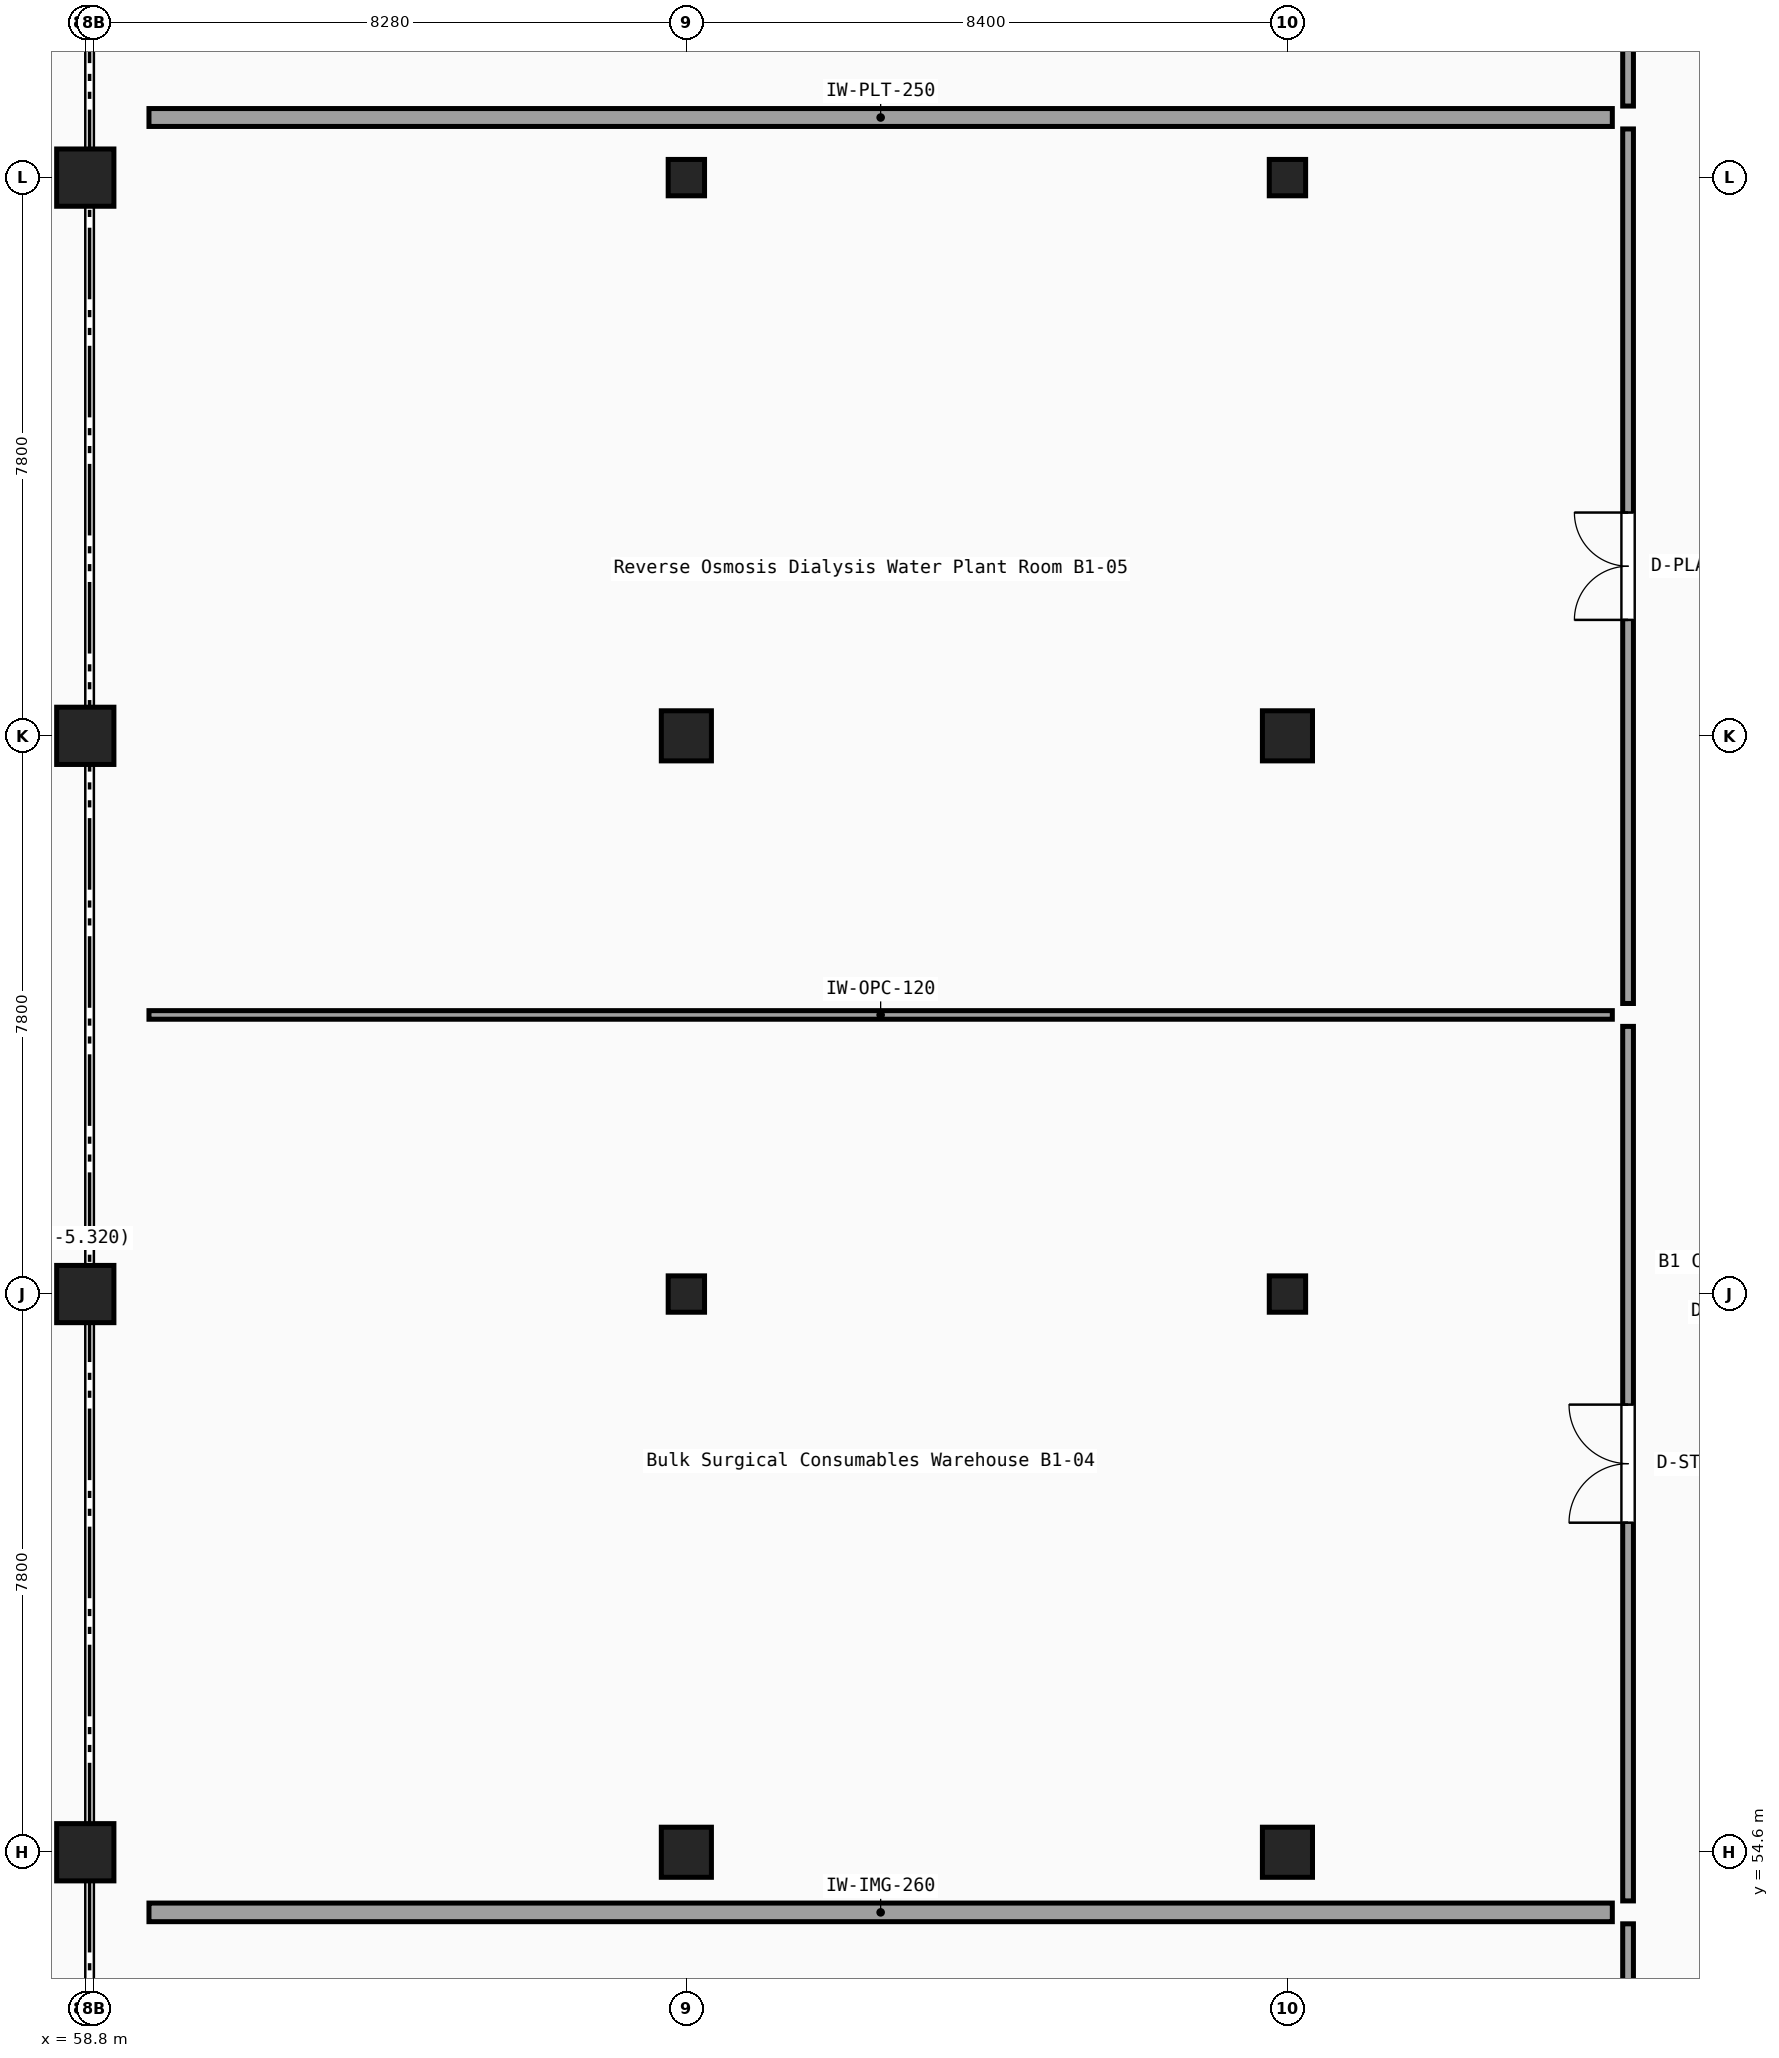
"""IFC4 building model, lengths in metres.
Left out: names, types, materials, properties, quantities, classifications, styles, units other than length and angle.
Written with IfcOpenShell. Run it as: python <this file> out.ifc"""

import sys

from ifc_helpers import new_model, si_unit, direction, frame, frame_2d, origin, origin_2d, place, context, subcontext, project, spatial, rectangle, hollow_circle, extrude, element, fill, save


model = new_model("IFC4")
c1 = context("Model", 3, precision=1e-05, world=origin(), true_north=direction((0.0, 1.0)))
c2 = subcontext(c1, "Body", "Model", "MODEL_VIEW")
j1 = project(units=[si_unit("LENGTHUNIT", "METRE"), si_unit("PLANEANGLEUNIT", "RADIAN")], contexts=[c1])
p1 = place(None, origin())
s1 = spatial("IfcSite", under=j1, at=p1, CompositionType="ELEMENT")
p2 = place(p1, origin())
s2 = spatial("IfcBuilding", under=s1, at=p2, CompositionType="ELEMENT")
p3 = place(p2, frame((0.0, 0.0, -5.1)))
s3 = spatial("IfcBuildingStorey", under=s2, at=p3, CompositionType="ELEMENT", Elevation=-5.1)
p4 = place(p3, frame((75.6, 54.6, -0.22), z_axis=(0.0, 0.0, 1.0), x_axis=(1.0, 0.0, 0.0)))
e1 = element("IfcColumn", 1, at=p4, inside=s3, PredefinedType="COLUMN", context=c2, shape_type="SweptSolid", body=[
    extrude(rectangle(XDim=0.7, YDim=0.7, at=origin_2d()), origin(), (0.0, 0.0, 1.0), 5.32),
])
p5 = place(p3, frame((75.6, 62.4, -0.22), z_axis=(0.0, 0.0, 1.0), x_axis=(1.0, 0.0, 0.0)))
e2 = element("IfcColumn", 2, at=p5, inside=s3, PredefinedType="COLUMN", context=c2, shape_type="SweptSolid", body=[
    extrude(hollow_circle(Radius=0.254, WallThickness=0.02, at=origin_2d()), origin(), (0.0, 0.0, 1.0), 5.32),
])
p6 = place(p3, frame((75.6, 70.2, -0.22), z_axis=(0.0, 0.0, 1.0), x_axis=(1.0, 0.0, 0.0)))
e3 = element("IfcColumn", 3, at=p6, inside=s3, PredefinedType="COLUMN", context=c2, shape_type="SweptSolid", body=[
    extrude(rectangle(XDim=0.7, YDim=0.7, at=origin_2d()), origin(), (0.0, 0.0, 1.0), 5.32),
])
p7 = place(p3, frame((75.6, 78.0, -0.22), z_axis=(0.0, 0.0, 1.0), x_axis=(1.0, 0.0, 0.0)))
e4 = element("IfcColumn", 4, at=p7, inside=s3, PredefinedType="COLUMN", context=c2, shape_type="SweptSolid", body=[
    extrude(hollow_circle(Radius=0.254, WallThickness=0.02, at=origin_2d()), origin(), (0.0, 0.0, 1.0), 5.32),
])
for number, where, z_axis, x_axis in (
    (5, (58.8, 54.6, -0.22), (0.0, 0.0, 1.0), (1.0, 0.0, 0.0)),
    (6, (58.8, 62.4, -0.22), (0.0, 0.0, 1.0), (1.0, 0.0, 0.0)),
    (7, (58.8, 70.2, -0.22), (0.0, 0.0, 1.0), (1.0, 0.0, 0.0)),
    (8, (58.8, 78.0, -0.22), (0.0, 0.0, 1.0), (1.0, 0.0, 0.0)),
):
    element("IfcColumn", number, at=place(p3, frame(where, z_axis=z_axis, x_axis=x_axis)), inside=s3, PredefinedType="COLUMN", context=c2, shape_type="SweptSolid", body=[
        extrude(rectangle(XDim=0.8, YDim=0.8, at=origin_2d()), origin(), (0.0, 0.0, 1.0), 5.32),
    ])
p8 = place(p3, frame((67.2, 54.6, -0.22), z_axis=(0.0, 0.0, 1.0), x_axis=(1.0, 0.0, 0.0)))
e9 = element("IfcColumn", 9, at=p8, inside=s3, PredefinedType="COLUMN", context=c2, shape_type="SweptSolid", body=[
    extrude(rectangle(XDim=0.7, YDim=0.7, at=origin_2d()), origin(), (0.0, 0.0, 1.0), 5.32),
])
p9 = place(p3, frame((67.2, 62.4, -0.22), z_axis=(0.0, 0.0, 1.0), x_axis=(1.0, 0.0, 0.0)))
e10 = element("IfcColumn", 10, at=p9, inside=s3, PredefinedType="COLUMN", context=c2, shape_type="SweptSolid", body=[
    extrude(hollow_circle(Radius=0.254, WallThickness=0.02, at=origin_2d()), origin(), (0.0, 0.0, 1.0), 5.32),
])
p10 = place(p3, frame((67.2, 70.2, -0.22), z_axis=(0.0, 0.0, 1.0), x_axis=(1.0, 0.0, 0.0)))
e11 = element("IfcColumn", 11, at=p10, inside=s3, PredefinedType="COLUMN", context=c2, shape_type="SweptSolid", body=[
    extrude(rectangle(XDim=0.7, YDim=0.7, at=origin_2d()), origin(), (0.0, 0.0, 1.0), 5.32),
])
p11 = place(p3, frame((67.2, 78.0, -0.22), z_axis=(0.0, 0.0, 1.0), x_axis=(1.0, 0.0, 0.0)))
e12 = element("IfcColumn", 12, at=p11, inside=s3, PredefinedType="COLUMN", context=c2, shape_type="SweptSolid", body=[
    extrude(hollow_circle(Radius=0.254, WallThickness=0.02, at=origin_2d()), origin(), (0.0, 0.0, 1.0), 5.32),
])
p12 = place(p3, frame((80.36, 41.38, 0.0), z_axis=(0.0, 0.0, 1.0), x_axis=(0.0, 1.0, 0.0)))
e13 = element("IfcWall", 13, at=p12, inside=s3, PredefinedType="PARTITIONING", context=c2, shape_type="SweptSolid", body=[
    extrude(rectangle(XDim=12.22, YDim=0.15, at=frame_2d((6.11, 0.0))), origin(), (0.0, 0.0, 1.0), 4.82),
])
p13 = place(p12, frame((5.335, 0.0, 0.0)))
e14 = element("IfcOpeningElement", 14, at=p13, cuts=e13, PredefinedType="OPENING", context=c2, shape_type="SweptSolid", body=[
    extrude(rectangle(XDim=1.55, YDim=2.25, at=frame_2d((0.775, 1.125))), frame((0.0, 0.085, 0.0), z_axis=(0.0, -1.0, 0.0), x_axis=(1.0, 0.0, 0.0)), (0.0, 0.0, 1.0), 0.17),
])
p14 = place(p3, frame((59.69, 53.76, 0.0), z_axis=(0.0, 0.0, 1.0), x_axis=(1.0, 0.0, 0.0)))
e15 = element("IfcWall", 15, at=p14, inside=s3, PredefinedType="PARTITIONING", context=c2, shape_type="SweptSolid", body=[
    extrude(rectangle(XDim=20.45, YDim=0.26, at=frame_2d((10.225, 0.0))), origin(), (0.0, 0.0, 1.0), 4.82),
])
p15 = place(p3, frame((80.36, 53.92, 0.0), z_axis=(0.0, 0.0, 1.0), x_axis=(0.0, 1.0, 0.0)))
e16 = element("IfcWall", 16, at=p15, inside=s3, PredefinedType="PARTITIONING", context=c2, shape_type="SweptSolid", body=[
    extrude(rectangle(XDim=12.22, YDim=0.15, at=frame_2d((6.11, 0.0))), origin(), (0.0, 0.0, 1.0), 4.82),
])
p16 = place(p15, frame((5.285, 0.0, 0.0)))
e17 = element("IfcOpeningElement", 17, at=p16, cuts=e16, PredefinedType="OPENING", context=c2, shape_type="SweptSolid", body=[
    extrude(rectangle(XDim=1.65, YDim=2.2, at=frame_2d((0.825, 1.1))), frame((0.0, 0.085, 0.0), z_axis=(0.0, -1.0, 0.0), x_axis=(1.0, 0.0, 0.0)), (0.0, 0.0, 1.0), 0.17),
])
p17 = place(p3, frame((59.69, 66.3, 0.0), z_axis=(0.0, 0.0, 1.0), x_axis=(1.0, 0.0, 0.0)))
e18 = element("IfcWall", 18, at=p17, inside=s3, PredefinedType="PARTITIONING", context=c2, shape_type="SweptSolid", body=[
    extrude(rectangle(XDim=20.45, YDim=0.12, at=frame_2d((10.225, 0.0))), origin(), (0.0, 0.0, 1.0), 4.82),
])
p18 = place(p3, frame((80.36, 66.46, 0.0), z_axis=(0.0, 0.0, 1.0), x_axis=(0.0, 1.0, 0.0)))
e19 = element("IfcWall", 19, at=p18, inside=s3, PredefinedType="PARTITIONING", context=c2, shape_type="SweptSolid", body=[
    extrude(rectangle(XDim=12.22, YDim=0.15, at=frame_2d((6.11, 0.0))), origin(), (0.0, 0.0, 1.0), 4.82),
])
p19 = place(p18, frame((5.36, 0.0, 0.0)))
e20 = element("IfcOpeningElement", 20, at=p19, cuts=e19, PredefinedType="OPENING", context=c2, shape_type="SweptSolid", body=[
    extrude(rectangle(XDim=1.5, YDim=2.25, at=frame_2d((0.75, 1.125))), frame((0.0, 0.085, 0.0), z_axis=(0.0, -1.0, 0.0), x_axis=(1.0, 0.0, 0.0)), (0.0, 0.0, 1.0), 0.17),
])
p20 = place(p3, frame((59.69, 78.84, 0.0), z_axis=(0.0, 0.0, 1.0), x_axis=(1.0, 0.0, 0.0)))
e21 = element("IfcWall", 21, at=p20, inside=s3, PredefinedType="PARTITIONING", context=c2, shape_type="SweptSolid", body=[
    extrude(rectangle(XDim=20.45, YDim=0.25, at=frame_2d((10.225, 0.0))), origin(), (0.0, 0.0, 1.0), 4.82),
])
p21 = place(p3, frame((80.36, 79.0, 0.0), z_axis=(0.0, 0.0, 1.0), x_axis=(0.0, 1.0, 0.0)))
e22 = element("IfcWall", 22, at=p21, inside=s3, PredefinedType="PARTITIONING", context=c2, shape_type="SweptSolid", body=[
    extrude(rectangle(XDim=12.22, YDim=0.15, at=frame_2d((6.11, 0.0))), origin(), (0.0, 0.0, 1.0), 4.41),
])
p22 = place(p21, frame((5.36, 0.0, 0.0)))
e23 = element("IfcOpeningElement", 23, at=p22, cuts=e22, PredefinedType="OPENING", context=c2, shape_type="SweptSolid", body=[
    extrude(rectangle(XDim=1.5, YDim=2.25, at=frame_2d((0.75, 1.125))), frame((0.0, 0.085, 0.0), z_axis=(0.0, -1.0, 0.0), x_axis=(1.0, 0.0, 0.0)), (0.0, 0.0, 1.0), 0.17),
])
p23 = place(p16, origin())
e24 = element("IfcDoor", 24, at=p23, inside=s3, OperationType="DOUBLE_DOOR_SINGLE_SWING", PredefinedType="DOOR", context=c2, shape_type="SweptSolid", body=[
    extrude(rectangle(XDim=1.65, YDim=2.2, at=frame_2d((0.825, 1.1))), frame((0.0, 0.025, 0.0), z_axis=(0.0, -1.0, 0.0), x_axis=(1.0, 0.0, 0.0)), (0.0, 0.0, 1.0), 0.05),
])
fill(e17, e24)
p24 = place(p19, origin())
e25 = element("IfcDoor", 25, at=p24, inside=s3, OperationType="DOUBLE_DOOR_SINGLE_SWING", PredefinedType="DOOR", context=c2, shape_type="SweptSolid", body=[
    extrude(rectangle(XDim=1.5, YDim=2.25, at=frame_2d((0.75, 1.125))), frame((0.0, 0.025, 0.0), z_axis=(0.0, -1.0, 0.0), x_axis=(1.0, 0.0, 0.0)), (0.0, 0.0, 1.0), 0.05),
])
fill(e20, e25)
save(model, sys.argv[1])
